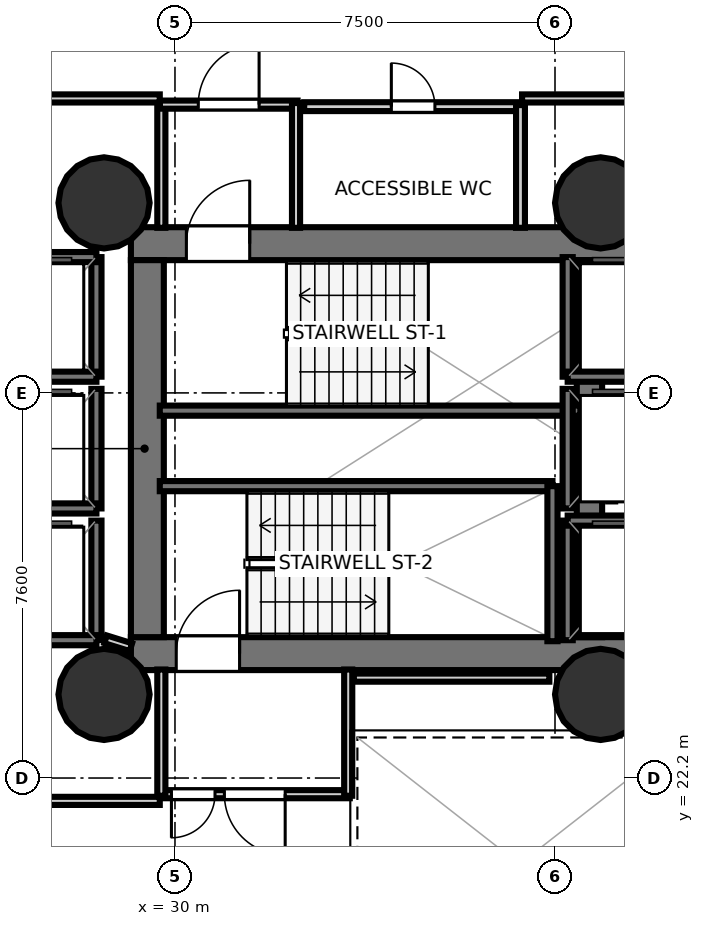
"""IFC4 building model, lengths in metres.
Left out: names, types, materials, properties, quantities, classifications, styles, units other than length and angle.
Written with IfcOpenShell. Run it as: python <this file> out.ifc"""

import sys

from ifc_helpers import new_model, si_unit, direction, frame, frame_2d, origin, origin_2d, place, context, subcontext, project, spatial, rectangle, hollow_circle, extrude, element, fill, save


model = new_model("IFC4")
c1 = context("Model", 3, precision=1e-05, world=origin(), true_north=direction((0.0, 1.0)))
c2 = subcontext(c1, "Body", "Model", "MODEL_VIEW")
j1 = project(units=[si_unit("LENGTHUNIT", "METRE"), si_unit("PLANEANGLEUNIT", "RADIAN")], contexts=[c1])
p1 = place(None, origin())
s1 = spatial("IfcSite", under=j1, at=p1, CompositionType="ELEMENT")
p2 = place(p1, origin())
s2 = spatial("IfcBuilding", under=s1, at=p2, CompositionType="ELEMENT")
p3 = place(p2, frame((0.0, 0.0, 44.2)))
s3 = spatial("IfcBuildingStorey", under=s2, at=p3, CompositionType="ELEMENT", Elevation=44.2)
p4 = place(p3, frame((29.13, 32.745, 0.0), z_axis=(0.0, 0.0, 1.0), x_axis=(1.0, 0.0, 0.0)))
e1 = element("IfcWall", 1, at=p4, inside=s3, PredefinedType="SHEAR", context=c2, shape_type="SweptSolid", body=[
    extrude(rectangle(XDim=10.72, YDim=0.65, at=frame_2d((5.36, 0.0))), origin(), (0.0, 0.0, 1.0), 3.4),
])
p5 = place(p4, frame((1.095, 0.0, 0.0)))
e2 = element("IfcOpeningElement", 2, at=p5, cuts=e1, PredefinedType="OPENING", context=c2, shape_type="SweptSolid", body=[
    extrude(rectangle(XDim=1.25, YDim=2.15, at=frame_2d((0.625, 1.075))), frame((0.0, 0.335, 0.0), z_axis=(0.0, -1.0, 0.0), x_axis=(1.0, 0.0, 0.0)), (0.0, 0.0, 1.0), 0.67),
])
p6 = place(p3, frame((29.13, 24.655, 0.0), z_axis=(0.0, 0.0, 1.0), x_axis=(1.0, 0.0, 0.0)))
e3 = element("IfcWall", 3, at=p6, inside=s3, PredefinedType="SHEAR", context=c2, shape_type="SweptSolid", body=[
    extrude(rectangle(XDim=10.72, YDim=0.65, at=frame_2d((5.36, 0.0))), origin(), (0.0, 0.0, 1.0), 3.4),
])
p7 = place(p6, frame((0.895, 0.0, 0.0)))
e4 = element("IfcOpeningElement", 4, at=p7, cuts=e3, PredefinedType="OPENING", context=c2, shape_type="SweptSolid", body=[
    extrude(rectangle(XDim=1.25, YDim=2.15, at=frame_2d((0.625, 1.075))), frame((0.0, 0.335, 0.0), z_axis=(0.0, -1.0, 0.0), x_axis=(1.0, 0.0, 0.0)), (0.0, 0.0, 1.0), 0.67),
])
p8 = place(p3, frame((29.455, 24.98, 0.0), z_axis=(0.0, 0.0, 1.0), x_axis=(0.0, 1.0, 0.0)))
e5 = element("IfcWall", 5, at=p8, inside=s3, PredefinedType="SHEAR", context=c2, shape_type="SweptSolid", body=[
    extrude(rectangle(XDim=7.44, YDim=0.65, at=frame_2d((3.72, 0.0))), origin(), (0.0, 0.0, 1.0), 3.4),
])
p9 = place(p3, frame((38.18, 24.98, 0.0), z_axis=(0.0, 0.0, 1.0), x_axis=(0.0, 1.0, 0.0)))
e6 = element("IfcWall", 6, at=p9, inside=s3, PredefinedType="SHEAR", context=c2, shape_type="SweptSolid", body=[
    extrude(rectangle(XDim=7.44, YDim=0.5, at=frame_2d((3.72, 0.0))), origin(), (0.0, 0.0, 1.0), 3.4),
])
for number, where, z_axis, x_axis in (
    (7, (28.6, 33.55, 0.0), (0.0, 0.0, 1.0), (1.0, 0.0, 0.0)),
    (8, (28.6, 23.85, 0.0), (0.0, 0.0, 1.0), (1.0, 0.0, 0.0)),
    (9, (38.4, 33.55, 0.0), (0.0, 0.0, 1.0), (1.0, 0.0, 0.0)),
    (10, (38.4, 23.85, 0.0), (0.0, 0.0, 1.0), (1.0, 0.0, 0.0)),
):
    element("IfcColumn", number, at=place(p3, frame(where, z_axis=z_axis, x_axis=x_axis)), inside=s3, PredefinedType="COLUMN", context=c2, shape_type="SweptSolid", body=[
        extrude(hollow_circle(Radius=0.9, WallThickness=0.045, at=origin_2d()), origin(), (0.0, 0.0, 1.0), 3.7),
    ])
p10 = place(p3, frame((29.7, 29.45, 0.0), z_axis=(0.0, 0.0, 1.0), x_axis=(1.0, 0.0, 0.0)))
e11 = element("IfcWall", 11, at=p10, inside=s3, PredefinedType="SOLIDWALL", context=c2, shape_type="SweptSolid", body=[
    extrude(rectangle(XDim=8.3, YDim=0.2, at=frame_2d((4.15, 0.0))), origin(), (0.0, 0.0, 1.0), 3.4),
])
p11 = place(p3, frame((29.7, 27.96, 0.0), z_axis=(0.0, 0.0, 1.0), x_axis=(1.0, 0.0, 0.0)))
e12 = element("IfcWall", 12, at=p11, inside=s3, PredefinedType="SOLIDWALL", context=c2, shape_type="SweptSolid", body=[
    extrude(rectangle(XDim=7.75, YDim=0.2, at=frame_2d((3.875, 0.0))), origin(), (0.0, 0.0, 1.0), 3.4),
])
p12 = place(p3, frame((37.45, 24.9, 0.0), z_axis=(0.0, 0.0, 1.0), x_axis=(0.0, 1.0, 0.0)))
e13 = element("IfcWall", 13, at=p12, inside=s3, PredefinedType="SOLIDWALL", context=c2, shape_type="SweptSolid", body=[
    extrude(rectangle(XDim=3.06, YDim=0.2, at=frame_2d((1.53, 0.0))), origin(), (0.0, 0.0, 1.0), 3.4),
])
p13 = place(p3, frame((37.75, 30.12, 0.0), z_axis=(0.0, 0.0, 1.0), x_axis=(0.0, 1.0, 0.0)))
e14 = element("IfcWall", 14, at=p13, inside=s3, PredefinedType="SOLIDWALL", context=c2, shape_type="SweptSolid", body=[
    extrude(rectangle(XDim=2.36, YDim=0.2, at=frame_2d((1.18, 0.0))), origin(), (0.0, 0.0, 1.0), 3.4),
])
p14 = place(p3, frame((37.75, 30.12, 0.0), z_axis=(0.0, 0.0, 1.0), x_axis=(1.0, 0.0, 0.0)))
e15 = element("IfcWall", 15, at=p14, inside=s3, PredefinedType="SOLIDWALL", context=c2, shape_type="SweptSolid", body=[
    extrude(rectangle(XDim=2.1, YDim=0.2, at=frame_2d((1.05, 0.0))), origin(), (0.0, 0.0, 1.0), 3.4),
])
p15 = place(p3, frame((37.75, 24.92, 0.0), z_axis=(0.0, 0.0, 1.0), x_axis=(0.0, 1.0, 0.0)))
e16 = element("IfcWall", 16, at=p15, inside=s3, PredefinedType="SOLIDWALL", context=c2, shape_type="SweptSolid", body=[
    extrude(rectangle(XDim=2.36, YDim=0.2, at=frame_2d((1.18, 0.0))), origin(), (0.0, 0.0, 1.0), 3.4),
])
p16 = place(p3, frame((37.75, 27.28, 0.0), z_axis=(0.0, 0.0, 1.0), x_axis=(1.0, 0.0, 0.0)))
e17 = element("IfcWall", 17, at=p16, inside=s3, PredefinedType="SOLIDWALL", context=c2, shape_type="SweptSolid", body=[
    extrude(rectangle(XDim=2.1, YDim=0.2, at=frame_2d((1.05, 0.0))), origin(), (0.0, 0.0, 1.0), 3.4),
])
p17 = place(p3, frame((28.45, 30.12, 0.0), z_axis=(0.0, 0.0, 1.0), x_axis=(0.0, 1.0, 0.0)))
e18 = element("IfcWall", 18, at=p17, inside=s3, PredefinedType="SOLIDWALL", context=c2, shape_type="SweptSolid", body=[
    extrude(rectangle(XDim=2.36, YDim=0.2, at=frame_2d((1.18, 0.0))), origin(), (0.0, 0.0, 1.0), 3.4),
])
for number, where, z_axis, x_axis in (
    (19, (26.35, 32.48, 0.0), (0.0, 0.0, 1.0), (1.0, 0.0, 0.0)),
    (20, (26.35, 30.12, 0.0), (0.0, 0.0, 1.0), (1.0, 0.0, 0.0)),
):
    element("IfcWall", number, at=place(p3, frame(where, z_axis=z_axis, x_axis=x_axis)), inside=s3, PredefinedType="SOLIDWALL", context=c2, shape_type="SweptSolid", body=[
        extrude(rectangle(XDim=2.1, YDim=0.2, at=frame_2d((1.05, 0.0))), origin(), (0.0, 0.0, 1.0), 3.4),
    ])
p18 = place(p3, frame((28.45, 27.52, 0.0), z_axis=(0.0, 0.0, 1.0), x_axis=(0.0, 1.0, 0.0)))
e21 = element("IfcWall", 21, at=p18, inside=s3, PredefinedType="SOLIDWALL", context=c2, shape_type="SweptSolid", body=[
    extrude(rectangle(XDim=2.36, YDim=0.2, at=frame_2d((1.18, 0.0))), origin(), (0.0, 0.0, 1.0), 3.4),
])
p19 = place(p3, frame((26.35, 27.52, 0.0), z_axis=(0.0, 0.0, 1.0), x_axis=(1.0, 0.0, 0.0)))
e22 = element("IfcWall", 22, at=p19, inside=s3, PredefinedType="SOLIDWALL", context=c2, shape_type="SweptSolid", body=[
    extrude(rectangle(XDim=2.1, YDim=0.2, at=frame_2d((1.05, 0.0))), origin(), (0.0, 0.0, 1.0), 3.4),
])
p20 = place(p3, frame((28.45, 24.92, 0.0), z_axis=(0.0, 0.0, 1.0), x_axis=(0.0, 1.0, 0.0)))
e23 = element("IfcWall", 23, at=p20, inside=s3, PredefinedType="SOLIDWALL", context=c2, shape_type="SweptSolid", body=[
    extrude(rectangle(XDim=2.36, YDim=0.2, at=frame_2d((1.18, 0.0))), origin(), (0.0, 0.0, 1.0), 3.4),
])
p21 = place(p3, frame((26.35, 24.92, 0.0), z_axis=(0.0, 0.0, 1.0), x_axis=(1.0, 0.0, 0.0)))
e24 = element("IfcWall", 24, at=p21, inside=s3, PredefinedType="SOLIDWALL", context=c2, shape_type="SweptSolid", body=[
    extrude(rectangle(XDim=2.1, YDim=0.2, at=frame_2d((1.05, 0.0))), origin(), (0.0, 0.0, 1.0), 3.4),
])
p22 = place(p3, frame((37.75, 27.52, 0.0), z_axis=(0.0, 0.0, 1.0), x_axis=(0.0, 1.0, 0.0)))
e25 = element("IfcWall", 25, at=p22, inside=s3, PredefinedType="SOLIDWALL", context=c2, shape_type="SweptSolid", body=[
    extrude(rectangle(XDim=2.36, YDim=0.2, at=frame_2d((1.18, 0.0))), origin(), (0.0, 0.0, 1.0), 3.4),
])
p23 = place(p3, frame((29.731, 33.058, 0.0), z_axis=(0.0, 0.0, 1.0), x_axis=(0.0, 1.0, 0.0)))
e26 = element("IfcWall", 26, at=p23, inside=s3, PredefinedType="PARTITIONING", context=c2, shape_type="SweptSolid", body=[
    extrude(rectangle(XDim=2.462, YDim=0.16, at=frame_2d((1.231, 0.0))), origin(), (0.0, 0.0, 1.0), 2.72),
])
p24 = place(p3, frame((29.7, 35.489, 0.0), z_axis=(0.0, 0.0, 1.0), x_axis=(1.0, 0.0, 0.0)))
e27 = element("IfcWall", 27, at=p24, inside=s3, PredefinedType="PARTITIONING", context=c2, shape_type="SweptSolid", body=[
    extrude(rectangle(XDim=2.72, YDim=0.16, at=frame_2d((1.36, 0.0))), origin(), (0.0, 0.0, 1.0), 2.72),
])
p25 = place(p24, frame((0.76, 0.0, 0.0)))
e28 = element("IfcOpeningElement", 28, at=p25, cuts=e27, PredefinedType="OPENING", context=c2, shape_type="SweptSolid", body=[
    extrude(rectangle(XDim=1.2, YDim=2.15, at=frame_2d((0.6, 1.075))), frame((0.0, 0.09, 0.0), z_axis=(0.0, -1.0, 0.0), x_axis=(1.0, 0.0, 0.0)), (0.0, 0.0, 1.0), 0.18),
])
p26 = place(p3, frame((32.389, 35.52, 0.0), z_axis=(0.0, 0.0, 1.0), x_axis=(0.0, -1.0, 0.0)))
e29 = element("IfcWall", 29, at=p26, inside=s3, PredefinedType="PARTITIONING", context=c2, shape_type="SweptSolid", body=[
    extrude(rectangle(XDim=2.462, YDim=0.16, at=frame_2d((1.231, 0.0))), origin(), (0.0, 0.0, 1.0), 2.72),
])
p27 = place(p3, frame((33.45, 21.881, 0.0), z_axis=(0.0, 0.0, 1.0), x_axis=(-1.0, 0.0, 0.0)))
e30 = element("IfcWall", 30, at=p27, inside=s3, PredefinedType="PARTITIONING", context=c2, shape_type="SweptSolid", body=[
    extrude(rectangle(XDim=3.75, YDim=0.16, at=frame_2d((1.875, 0.0))), origin(), (0.0, 0.0, 1.0), 2.72),
])
p28 = place(p27, frame((1.275, 0.0, 0.0)))
e31 = element("IfcOpeningElement", 31, at=p28, cuts=e30, PredefinedType="OPENING", context=c2, shape_type="SweptSolid", body=[
    extrude(rectangle(XDim=1.2, YDim=2.15, at=frame_2d((0.6, 1.075))), frame((0.0, 0.09, 0.0), z_axis=(0.0, -1.0, 0.0), x_axis=(1.0, 0.0, 0.0)), (0.0, 0.0, 1.0), 0.18),
])
p29 = place(p27, frame((2.66, 0.0, 0.0)))
e32 = element("IfcOpeningElement", 32, at=p29, cuts=e30, PredefinedType="OPENING", context=c2, shape_type="SweptSolid", body=[
    extrude(rectangle(XDim=0.86, YDim=2.05, at=frame_2d((0.43, 1.025))), frame((0.0, 0.09, 0.0), z_axis=(0.0, -1.0, 0.0), x_axis=(1.0, 0.0, 0.0)), (0.0, 0.0, 1.0), 0.18),
])
for number, where, z_axis, x_axis in (
    (33, (29.731, 21.85, 0.0), (0.0, 0.0, 1.0), (0.0, 1.0, 0.0)),
    (34, (33.419, 24.342, 0.0), (0.0, 0.0, 1.0), (0.0, -1.0, 0.0)),
):
    element("IfcWall", number, at=place(p3, frame(where, z_axis=z_axis, x_axis=x_axis)), inside=s3, PredefinedType="PARTITIONING", context=c2, shape_type="SweptSolid", body=[
        extrude(rectangle(XDim=2.492, YDim=0.16, at=frame_2d((1.246, 0.0))), origin(), (0.0, 0.0, 1.0), 2.72),
    ])
p30 = place(p3, frame((32.55, 35.449, 0.0), z_axis=(0.0, 0.0, 1.0), x_axis=(1.0, 0.0, 0.0)))
e35 = element("IfcWall", 35, at=p30, inside=s3, PredefinedType="PLUMBINGWALL", context=c2, shape_type="SweptSolid", body=[
    extrude(rectangle(XDim=4.3, YDim=0.175, at=frame_2d((2.15, 0.0))), origin(), (0.0, 0.0, 1.0), 2.72),
])
p31 = place(p30, frame((1.72, 0.0, 0.0)))
e36 = element("IfcOpeningElement", 36, at=p31, cuts=e35, PredefinedType="OPENING", context=c2, shape_type="SweptSolid", body=[
    extrude(rectangle(XDim=0.86, YDim=2.05, at=frame_2d((0.43, 1.025))), frame((0.0, 0.097, 0.0), z_axis=(0.0, -1.0, 0.0), x_axis=(1.0, 0.0, 0.0)), (0.0, 0.0, 1.0), 0.195),
])
p32 = place(p3, frame((36.819, 35.48, 0.0), z_axis=(0.0, 0.0, 1.0), x_axis=(0.0, -1.0, 0.0)))
e37 = element("IfcWall", 37, at=p32, inside=s3, PredefinedType="PLUMBINGWALL", context=c2, shape_type="SweptSolid", body=[
    extrude(rectangle(XDim=2.422, YDim=0.175, at=frame_2d((1.211, 0.0))), origin(), (0.0, 0.0, 1.0), 2.72),
])
p33 = place(p3, frame((29.13, 24.782, 0.0), z_axis=(0.0, 0.0, 1.0), x_axis=(-0.955000482512, 0.296604245422, 0.0)))
e38 = element("IfcWall", 38, at=p33, inside=s3, PredefinedType="PARTITIONING", context=c2, shape_type="SweptSolid", body=[
    extrude(rectangle(XDim=0.524, YDim=0.16, at=frame_2d((0.262, 0.0))), origin(), (0.0, 0.0, 1.0), 2.72),
])
p34 = place(p3, frame((37.389, 24.181, 0.0), z_axis=(0.0, 0.0, 1.0), x_axis=(-1.0, 0.0, 0.0)))
e39 = element("IfcWall", 39, at=p34, inside=s3, PredefinedType="PARTITIONING", context=c2, shape_type="SweptSolid", body=[
    extrude(rectangle(XDim=3.859, YDim=0.16, at=frame_2d((1.929, 0.0))), origin(), (0.0, 0.0, 1.0), 2.72),
])
p35 = place(p3, frame((39.818, 35.611, 0.0), z_axis=(0.0, 0.0, 1.0), x_axis=(-1.0, 0.0, 0.0)))
e40 = element("IfcWall", 40, at=p35, inside=s3, PredefinedType="PARTITIONING", context=c2, shape_type="SweptSolid", body=[
    extrude(rectangle(XDim=2.968, YDim=0.16, at=frame_2d((1.484, 0.0))), origin(), (0.0, 0.0, 1.0), 2.72),
])
p36 = place(p3, frame((29.7, 35.611, 0.0), z_axis=(0.0, 0.0, 1.0), x_axis=(-1.0, 0.0, 0.0)))
e41 = element("IfcWall", 41, at=p36, inside=s3, PredefinedType="PARTITIONING", context=c2, shape_type="SweptSolid", body=[
    extrude(rectangle(XDim=3.28, YDim=0.16, at=frame_2d((1.64, 0.0))), origin(), (0.0, 0.0, 1.0), 2.678),
])
p37 = place(p3, frame((26.42, 21.749, 0.0), z_axis=(0.0, 0.0, 1.0), x_axis=(1.0, 0.0, 0.0)))
e42 = element("IfcWall", 42, at=p37, inside=s3, PredefinedType="PARTITIONING", context=c2, shape_type="SweptSolid", body=[
    extrude(rectangle(XDim=3.28, YDim=0.16, at=frame_2d((1.64, 0.0))), origin(), (0.0, 0.0, 1.0), 2.72),
])
p38 = place(p3, frame((37.896, 44.548, 0.0), z_axis=(0.0, 0.0, 1.0), x_axis=(0.674902776071, -0.737906662697, 0.0)))
e43 = element("IfcWall", 43, at=p38, inside=s3, PredefinedType="PARTITIONING", context=c2, shape_type="SweptSolid", body=[
    extrude(rectangle(XDim=31.144, YDim=0.105, at=frame_2d((15.572, 0.0))), origin(), (0.0, 0.0, 1.0), 2.678),
])
p39 = place(p5, origin())
e44 = element("IfcDoor", 44, at=p39, inside=s3, OperationType="SINGLE_SWING_RIGHT", PredefinedType="DOOR", context=c2, shape_type="SweptSolid", body=[
    extrude(rectangle(XDim=1.25, YDim=2.15, at=frame_2d((0.625, 1.075))), frame((0.0, 0.025, 0.0), z_axis=(0.0, -1.0, 0.0), x_axis=(1.0, 0.0, 0.0)), (0.0, 0.0, 1.0), 0.05),
])
fill(e2, e44)
p40 = place(p7, origin())
e45 = element("IfcDoor", 45, at=p40, inside=s3, OperationType="SINGLE_SWING_RIGHT", PredefinedType="DOOR", context=c2, shape_type="SweptSolid", body=[
    extrude(rectangle(XDim=1.25, YDim=2.15, at=frame_2d((0.625, 1.075))), frame((0.0, 0.025, 0.0), z_axis=(0.0, -1.0, 0.0), x_axis=(1.0, 0.0, 0.0)), (0.0, 0.0, 1.0), 0.05),
])
fill(e4, e45)
p41 = place(p25, origin())
e46 = element("IfcDoor", 46, at=p41, inside=s3, OperationType="SINGLE_SWING_RIGHT", PredefinedType="DOOR", context=c2, shape_type="SweptSolid", body=[
    extrude(rectangle(XDim=1.2, YDim=2.15, at=frame_2d((0.6, 1.075))), frame((0.0, 0.025, 0.0), z_axis=(0.0, -1.0, 0.0), x_axis=(1.0, 0.0, 0.0)), (0.0, 0.0, 1.0), 0.05),
])
fill(e28, e46)
p42 = place(p28, origin())
e47 = element("IfcDoor", 47, at=p42, inside=s3, OperationType="SINGLE_SWING_LEFT", PredefinedType="DOOR", context=c2, shape_type="SweptSolid", body=[
    extrude(rectangle(XDim=1.2, YDim=2.15, at=frame_2d((0.6, 1.075))), frame((0.0, 0.025, 0.0), z_axis=(0.0, -1.0, 0.0), x_axis=(1.0, 0.0, 0.0)), (0.0, 0.0, 1.0), 0.05),
])
fill(e31, e47)
p43 = place(p31, origin())
e48 = element("IfcDoor", 48, at=p43, inside=s3, OperationType="SINGLE_SWING_LEFT", PredefinedType="DOOR", context=c2, shape_type="SweptSolid", body=[
    extrude(rectangle(XDim=0.86, YDim=2.05, at=frame_2d((0.43, 1.025))), frame((0.0, 0.025, 0.0), z_axis=(0.0, -1.0, 0.0), x_axis=(1.0, 0.0, 0.0)), (0.0, 0.0, 1.0), 0.05),
])
fill(e36, e48)
p44 = place(p29, origin())
e49 = element("IfcDoor", 49, at=p44, inside=s3, OperationType="SINGLE_SWING_RIGHT", PredefinedType="DOOR", context=c2, shape_type="SweptSolid", body=[
    extrude(rectangle(XDim=0.86, YDim=2.05, at=frame_2d((0.43, 1.025))), frame((0.0, 0.025, 0.0), z_axis=(0.0, -1.0, 0.0), x_axis=(1.0, 0.0, 0.0)), (0.0, 0.0, 1.0), 0.05),
])
fill(e32, e49)
save(model, sys.argv[1])
